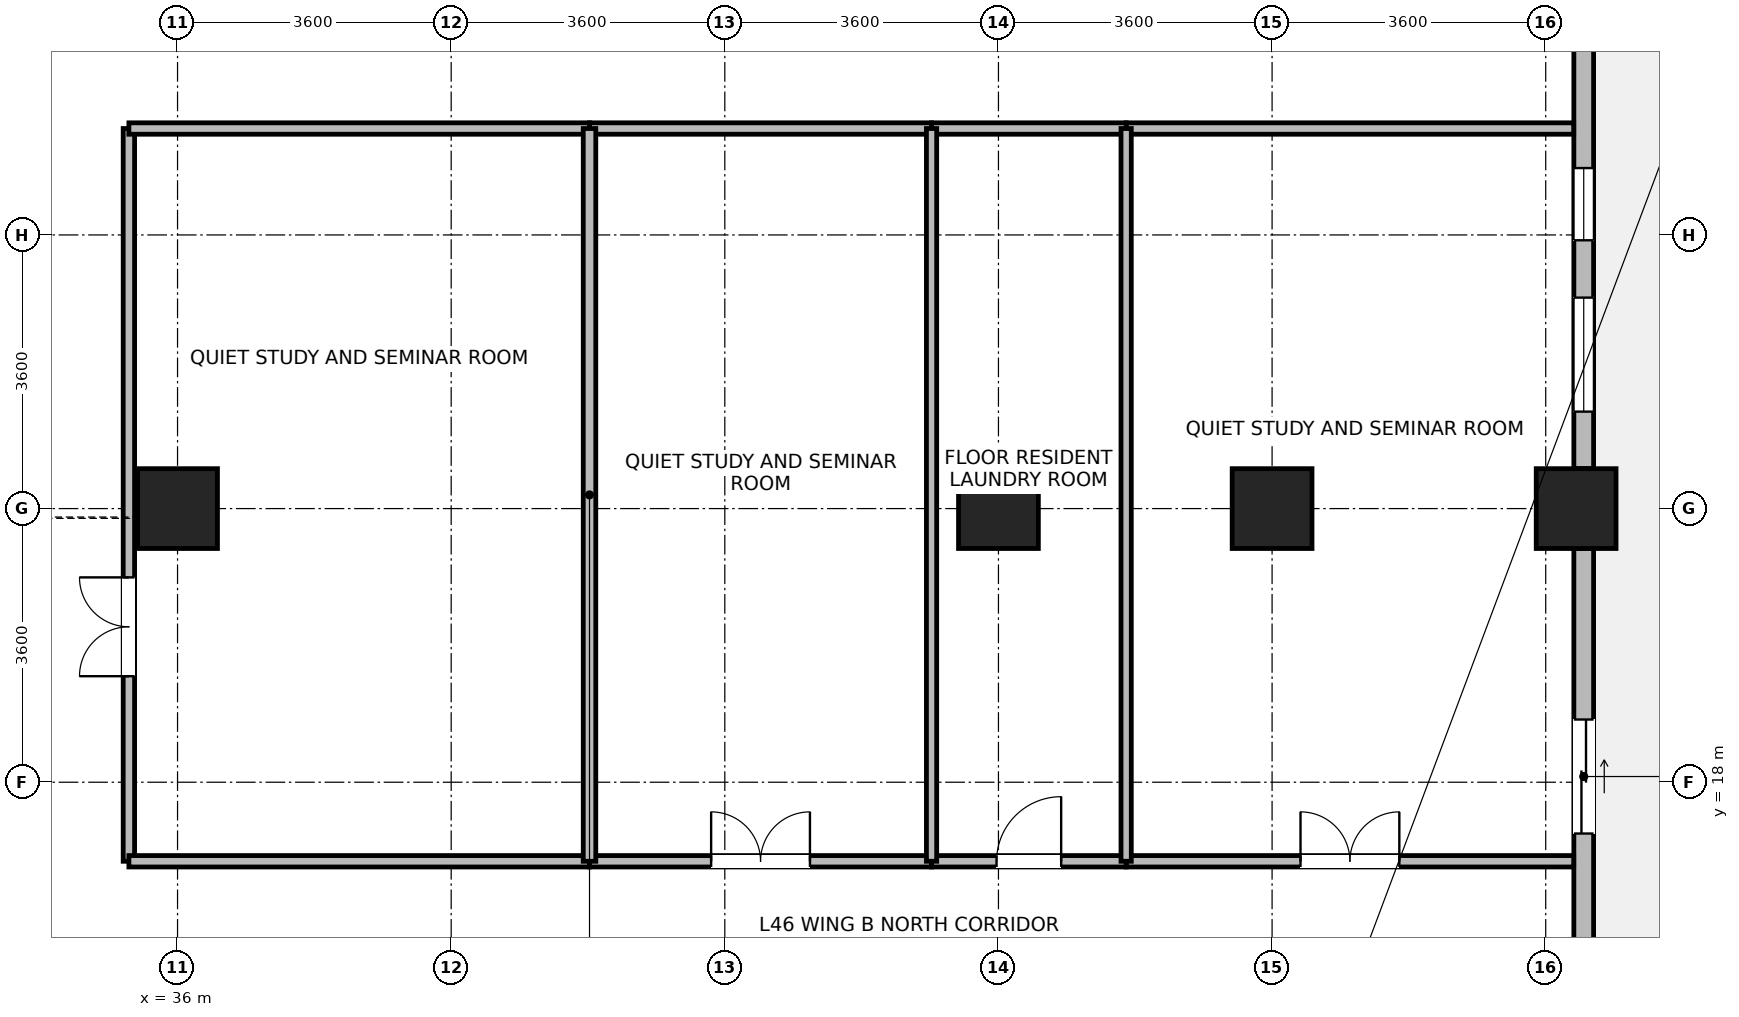
"""IFC4 building model, lengths in metres.
Left out: names, types, materials, properties, quantities, classifications, styles, units other than length and angle.
Written with IfcOpenShell. Run it as: python <this file> out.ifc"""

import sys

from ifc_helpers import new_model, si_unit, direction, frame, frame_2d, origin, origin_2d, place, context, subcontext, project, spatial, rectangle, extrude, source, transform, mapped, element, fill, save


model = new_model("IFC4")
c1 = context("Model", 3, precision=1e-05, world=origin(), true_north=direction((0.0, 1.0)))
c2 = subcontext(c1, "Body", "Model", "MODEL_VIEW")
j1 = project(units=[si_unit("LENGTHUNIT", "METRE"), si_unit("PLANEANGLEUNIT", "RADIAN")], contexts=[c1])
p1 = place(None, origin())
s1 = spatial("IfcSite", under=j1, at=p1, CompositionType="ELEMENT")
p2 = place(p1, origin())
s2 = spatial("IfcBuilding", under=s1, at=p2, CompositionType="ELEMENT")
p3 = place(p2, frame((0.0, 0.0, 180.9)))
s3 = spatial("IfcBuildingStorey", under=s2, at=p3, CompositionType="ELEMENT", Elevation=180.9)
m1 = source(origin(), c2, "Body", "SweptSolid", [
    extrude(rectangle(XDim=1.05, YDim=1.05, at=origin_2d()), origin(), (0.0, 0.0, 1.0), 3.7),
])
for number, where, z_axis, x_axis in (
    (1, (36.0, 21.6, 0.0), (0.0, 0.0, 1.0), (1.0, 0.0, 0.0)),
    (2, (46.8, 21.6, 0.0), (0.0, 0.0, 1.0), (1.0, 0.0, 0.0)),
    (3, (50.4, 21.6, 0.0), (0.0, 0.0, 1.0), (1.0, 0.0, 0.0)),
    (4, (54.4, 21.6, 0.0), (0.0, 0.0, 1.0), (1.0, 0.0, 0.0)),
):
    element("IfcColumn", number, at=place(p3, frame(where, z_axis=z_axis, x_axis=x_axis)), inside=s3, PredefinedType="COLUMN", context=c2, shape_type="MappedRepresentation", body=[
        mapped(m1, transform((0.0, 0.0, 0.0), x_axis=(1.0, 0.0, 0.0), y_axis=(0.0, 1.0, 0.0), z_axis=(0.0, 0.0, 1.0), scale=1.0)),
    ])
p4 = place(p3, frame((54.5, 21.074, 0.0), z_axis=(0.0, 0.0, 1.0), x_axis=(0.0, -1.0, 0.0)))
e5 = element("IfcWall", 5, at=p4, inside=s3, PredefinedType="STANDARD", context=c2, shape_type="SweptSolid", body=[
    extrude(rectangle(XDim=5.998, YDim=0.26, at=frame_2d((2.999, 0.0))), origin(), (0.0, 0.0, 1.0), 2.99),
])
p5 = place(p4, frame((2.249, 0.0, 0.0)))
e6 = element("IfcOpeningElement", 6, at=p5, cuts=e5, PredefinedType="OPENING", context=c2, shape_type="SweptSolid", body=[
    extrude(rectangle(XDim=1.5, YDim=2.15, at=frame_2d((0.75, 1.075))), frame((0.0, 0.14, 0.0), z_axis=(0.0, -1.0, 0.0), x_axis=(1.0, 0.0, 0.0)), (0.0, 0.0, 1.0), 0.28),
])
p6 = place(p3, frame((54.5, 28.124, 0.0), z_axis=(0.0, 0.0, 1.0), x_axis=(0.0, -1.0, 0.0)))
e7 = element("IfcWall", 7, at=p6, inside=s3, PredefinedType="STANDARD", context=c2, shape_type="SweptSolid", body=[
    extrude(rectangle(XDim=5.998, YDim=0.26, at=frame_2d((2.999, 0.0))), origin(), (0.0, 0.0, 1.0), 2.99),
])
p7 = place(p6, frame((3.749, 0.0, 0.85)))
e8 = element("IfcOpeningElement", 8, at=p7, cuts=e7, PredefinedType="OPENING", context=c2, shape_type="SweptSolid", body=[
    extrude(rectangle(XDim=1.5, YDim=1.85, at=frame_2d((0.75, 0.925))), frame((0.0, 0.14, 0.0), z_axis=(0.0, -1.0, 0.0), x_axis=(1.0, 0.0, 0.0)), (0.0, 0.0, 1.0), 0.28),
])
p8 = place(p6, frame((2.044, 0.0, 0.85)))
e9 = element("IfcOpeningElement", 9, at=p8, cuts=e7, PredefinedType="OPENING", context=c2, shape_type="SweptSolid", body=[
    extrude(rectangle(XDim=0.95, YDim=1.75, at=frame_2d((0.475, 0.875))), frame((0.0, 0.14, 0.0), z_axis=(0.0, -1.0, 0.0), x_axis=(1.0, 0.0, 0.0)), (0.0, 0.0, 1.0), 0.28),
])
p9 = place(p3, frame((35.36, 16.96, 0.0), z_axis=(0.0, 0.0, 1.0), x_axis=(0.0, 1.0, 0.0)))
e10 = element("IfcWall", 10, at=p9, inside=s3, PredefinedType="PARTITIONING", context=c2, shape_type="SweptSolid", body=[
    extrude(rectangle(XDim=9.64, YDim=0.15, at=frame_2d((4.82, 0.0))), origin(), (0.0, 0.0, 1.0), 3.44),
])
p10 = place(p9, frame((2.435, 0.0, 0.0)))
e11 = element("IfcOpeningElement", 11, at=p10, cuts=e10, PredefinedType="OPENING", context=c2, shape_type="SweptSolid", body=[
    extrude(rectangle(XDim=1.3, YDim=2.12, at=frame_2d((0.65, 1.06))), frame((0.0, 0.085, 0.0), z_axis=(0.0, -1.0, 0.0), x_axis=(1.0, 0.0, 0.0)), (0.0, 0.0, 1.0), 0.17),
])
for number, where, z_axis, x_axis in (
    (12, (35.36, 16.96, 0.0), (0.0, 0.0, 1.0), (1.0, 0.0, 0.0)),
    (13, (35.36, 26.6, 0.0), (0.0, 0.0, 1.0), (1.0, 0.0, 0.0)),
):
    element("IfcWall", number, at=place(p3, frame(where, z_axis=z_axis, x_axis=x_axis)), inside=s3, PredefinedType="PARTITIONING", context=c2, shape_type="SweptSolid", body=[
        extrude(rectangle(XDim=6.06, YDim=0.15, at=frame_2d((3.03, 0.0))), origin(), (0.0, 0.0, 1.0), 3.44),
    ])
p11 = place(p3, frame((48.48, 16.96, 0.0), z_axis=(0.0, 0.0, 1.0), x_axis=(1.0, 0.0, 0.0)))
e14 = element("IfcWall", 14, at=p11, inside=s3, PredefinedType="PARTITIONING", context=c2, shape_type="SweptSolid", body=[
    extrude(rectangle(XDim=5.888, YDim=0.15, at=frame_2d((2.944, 0.0))), origin(), (0.0, 0.0, 1.0), 3.44),
])
p12 = place(p11, frame((2.294, 0.0, 0.0)))
e15 = element("IfcOpeningElement", 15, at=p12, cuts=e14, PredefinedType="OPENING", context=c2, shape_type="SweptSolid", body=[
    extrude(rectangle(XDim=1.3, YDim=2.12, at=frame_2d((0.65, 1.06))), frame((0.0, 0.085, 0.0), z_axis=(0.0, -1.0, 0.0), x_axis=(1.0, 0.0, 0.0)), (0.0, 0.0, 1.0), 0.17),
])
p13 = place(p3, frame((48.48, 26.6, 0.0), z_axis=(0.0, 0.0, 1.0), x_axis=(1.0, 0.0, 0.0)))
e16 = element("IfcWall", 16, at=p13, inside=s3, PredefinedType="PARTITIONING", context=c2, shape_type="SweptSolid", body=[
    extrude(rectangle(XDim=5.888, YDim=0.15, at=frame_2d((2.944, 0.0))), origin(), (0.0, 0.0, 1.0), 3.44),
])
p14 = place(p3, frame((41.42, 16.96, 0.0), z_axis=(0.0, 0.0, 1.0), x_axis=(1.0, 0.0, 0.0)))
e17 = element("IfcWall", 17, at=p14, inside=s3, PredefinedType="PARTITIONING", context=c2, shape_type="SweptSolid", body=[
    extrude(rectangle(XDim=4.5, YDim=0.15, at=frame_2d((2.25, 0.0))), origin(), (0.0, 0.0, 1.0), 3.44),
])
p15 = place(p14, frame((1.6, 0.0, 0.0)))
e18 = element("IfcOpeningElement", 18, at=p15, cuts=e17, PredefinedType="OPENING", context=c2, shape_type="SweptSolid", body=[
    extrude(rectangle(XDim=1.3, YDim=2.12, at=frame_2d((0.65, 1.06))), frame((0.0, 0.085, 0.0), z_axis=(0.0, -1.0, 0.0), x_axis=(1.0, 0.0, 0.0)), (0.0, 0.0, 1.0), 0.17),
])
p16 = place(p3, frame((41.42, 26.6, 0.0), z_axis=(0.0, 0.0, 1.0), x_axis=(1.0, 0.0, 0.0)))
e19 = element("IfcWall", 19, at=p16, inside=s3, PredefinedType="PARTITIONING", context=c2, shape_type="SweptSolid", body=[
    extrude(rectangle(XDim=4.5, YDim=0.15, at=frame_2d((2.25, 0.0))), origin(), (0.0, 0.0, 1.0), 3.44),
])
p17 = place(p3, frame((45.92, 16.96, 0.0), z_axis=(0.0, 0.0, 1.0), x_axis=(1.0, 0.0, 0.0)))
e20 = element("IfcWall", 20, at=p17, inside=s3, PredefinedType="PARTITIONING", context=c2, shape_type="SweptSolid", body=[
    extrude(rectangle(XDim=2.56, YDim=0.15, at=frame_2d((1.28, 0.0))), origin(), (0.0, 0.0, 1.0), 3.44),
])
p18 = place(p17, frame((0.855, 0.0, 0.0)))
e21 = element("IfcOpeningElement", 21, at=p18, cuts=e20, PredefinedType="OPENING", context=c2, shape_type="SweptSolid", body=[
    extrude(rectangle(XDim=0.85, YDim=2.04, at=frame_2d((0.425, 1.02))), frame((0.0, 0.085, 0.0), z_axis=(0.0, -1.0, 0.0), x_axis=(1.0, 0.0, 0.0)), (0.0, 0.0, 1.0), 0.17),
])
p19 = place(p3, frame((45.92, 26.6, 0.0), z_axis=(0.0, 0.0, 1.0), x_axis=(1.0, 0.0, 0.0)))
e22 = element("IfcWall", 22, at=p19, inside=s3, PredefinedType="PARTITIONING", context=c2, shape_type="SweptSolid", body=[
    extrude(rectangle(XDim=2.56, YDim=0.15, at=frame_2d((1.28, 0.0))), origin(), (0.0, 0.0, 1.0), 3.44),
])
p20 = place(p3, frame((41.42, 16.96, 0.0), z_axis=(0.0, 0.0, 1.0), x_axis=(0.0, 1.0, 0.0)))
e23 = element("IfcWall", 23, at=p20, inside=s3, PredefinedType="PARTITIONING", context=c2, shape_type="SweptSolid", body=[
    extrude(rectangle(XDim=9.64, YDim=0.165, at=frame_2d((4.82, 0.0))), origin(), (0.0, 0.0, 1.0), 3.44),
])
for number, where, z_axis, x_axis in (
    (24, (45.92, 16.96, 0.0), (0.0, 0.0, 1.0), (0.0, 1.0, 0.0)),
    (25, (48.48, 16.96, 0.0), (0.0, 0.0, 1.0), (0.0, 1.0, 0.0)),
):
    element("IfcWall", number, at=place(p3, frame(where, z_axis=z_axis, x_axis=x_axis)), inside=s3, PredefinedType="PARTITIONING", context=c2, shape_type="SweptSolid", body=[
        extrude(rectangle(XDim=9.64, YDim=0.135, at=frame_2d((4.82, 0.0))), origin(), (0.0, 0.0, 1.0), 3.44),
    ])
p21 = place(p5, origin())
e26 = element("IfcDoor", 26, at=p21, inside=s3, OperationType="SLIDING_TO_LEFT", PredefinedType="DOOR", context=c2, shape_type="SweptSolid", body=[
    extrude(rectangle(XDim=1.5, YDim=2.15, at=frame_2d((0.75, 1.075))), frame((0.0, 0.025, 0.0), z_axis=(0.0, -1.0, 0.0), x_axis=(1.0, 0.0, 0.0)), (0.0, 0.0, 1.0), 0.05),
])
fill(e6, e26)
p22 = place(p7, origin())
e27 = element("IfcWindow", 27, at=p22, inside=s3, PartitioningType="SINGLE_PANEL", PredefinedType="WINDOW", context=c2, shape_type="SweptSolid", body=[
    extrude(rectangle(XDim=1.5, YDim=1.85, at=frame_2d((0.75, 0.925))), frame((0.0, 0.03, 0.0), z_axis=(0.0, -1.0, 0.0), x_axis=(1.0, 0.0, 0.0)), (0.0, 0.0, 1.0), 0.06),
])
fill(e8, e27)
p23 = place(p8, origin())
e28 = element("IfcWindow", 28, at=p23, inside=s3, PartitioningType="SINGLE_PANEL", PredefinedType="WINDOW", context=c2, shape_type="SweptSolid", body=[
    extrude(rectangle(XDim=0.95, YDim=1.75, at=frame_2d((0.475, 0.875))), frame((0.0, 0.03, 0.0), z_axis=(0.0, -1.0, 0.0), x_axis=(1.0, 0.0, 0.0)), (0.0, 0.0, 1.0), 0.06),
])
fill(e9, e28)
p24 = place(p10, origin())
e29 = element("IfcDoor", 29, at=p24, inside=s3, OperationType="DOUBLE_DOOR_SINGLE_SWING", PredefinedType="DOOR", context=c2, shape_type="SweptSolid", body=[
    extrude(rectangle(XDim=1.3, YDim=2.12, at=frame_2d((0.65, 1.06))), frame((0.0, 0.025, 0.0), z_axis=(0.0, -1.0, 0.0), x_axis=(1.0, 0.0, 0.0)), (0.0, 0.0, 1.0), 0.05),
])
fill(e11, e29)
p25 = place(p12, origin())
e30 = element("IfcDoor", 30, at=p25, inside=s3, OperationType="DOUBLE_DOOR_SINGLE_SWING", PredefinedType="DOOR", context=c2, shape_type="SweptSolid", body=[
    extrude(rectangle(XDim=1.3, YDim=2.12, at=frame_2d((0.65, 1.06))), frame((0.0, 0.025, 0.0), z_axis=(0.0, -1.0, 0.0), x_axis=(1.0, 0.0, 0.0)), (0.0, 0.0, 1.0), 0.05),
])
fill(e15, e30)
p26 = place(p15, origin())
e31 = element("IfcDoor", 31, at=p26, inside=s3, OperationType="DOUBLE_DOOR_SINGLE_SWING", PredefinedType="DOOR", context=c2, shape_type="SweptSolid", body=[
    extrude(rectangle(XDim=1.3, YDim=2.12, at=frame_2d((0.65, 1.06))), frame((0.0, 0.025, 0.0), z_axis=(0.0, -1.0, 0.0), x_axis=(1.0, 0.0, 0.0)), (0.0, 0.0, 1.0), 0.05),
])
fill(e18, e31)
p27 = place(p18, origin())
e32 = element("IfcDoor", 32, at=p27, inside=s3, OperationType="SINGLE_SWING_RIGHT", PredefinedType="DOOR", context=c2, shape_type="SweptSolid", body=[
    extrude(rectangle(XDim=0.85, YDim=2.04, at=frame_2d((0.425, 1.02))), frame((0.0, 0.025, 0.0), z_axis=(0.0, -1.0, 0.0), x_axis=(1.0, 0.0, 0.0)), (0.0, 0.0, 1.0), 0.05),
])
fill(e21, e32)
save(model, sys.argv[1])
